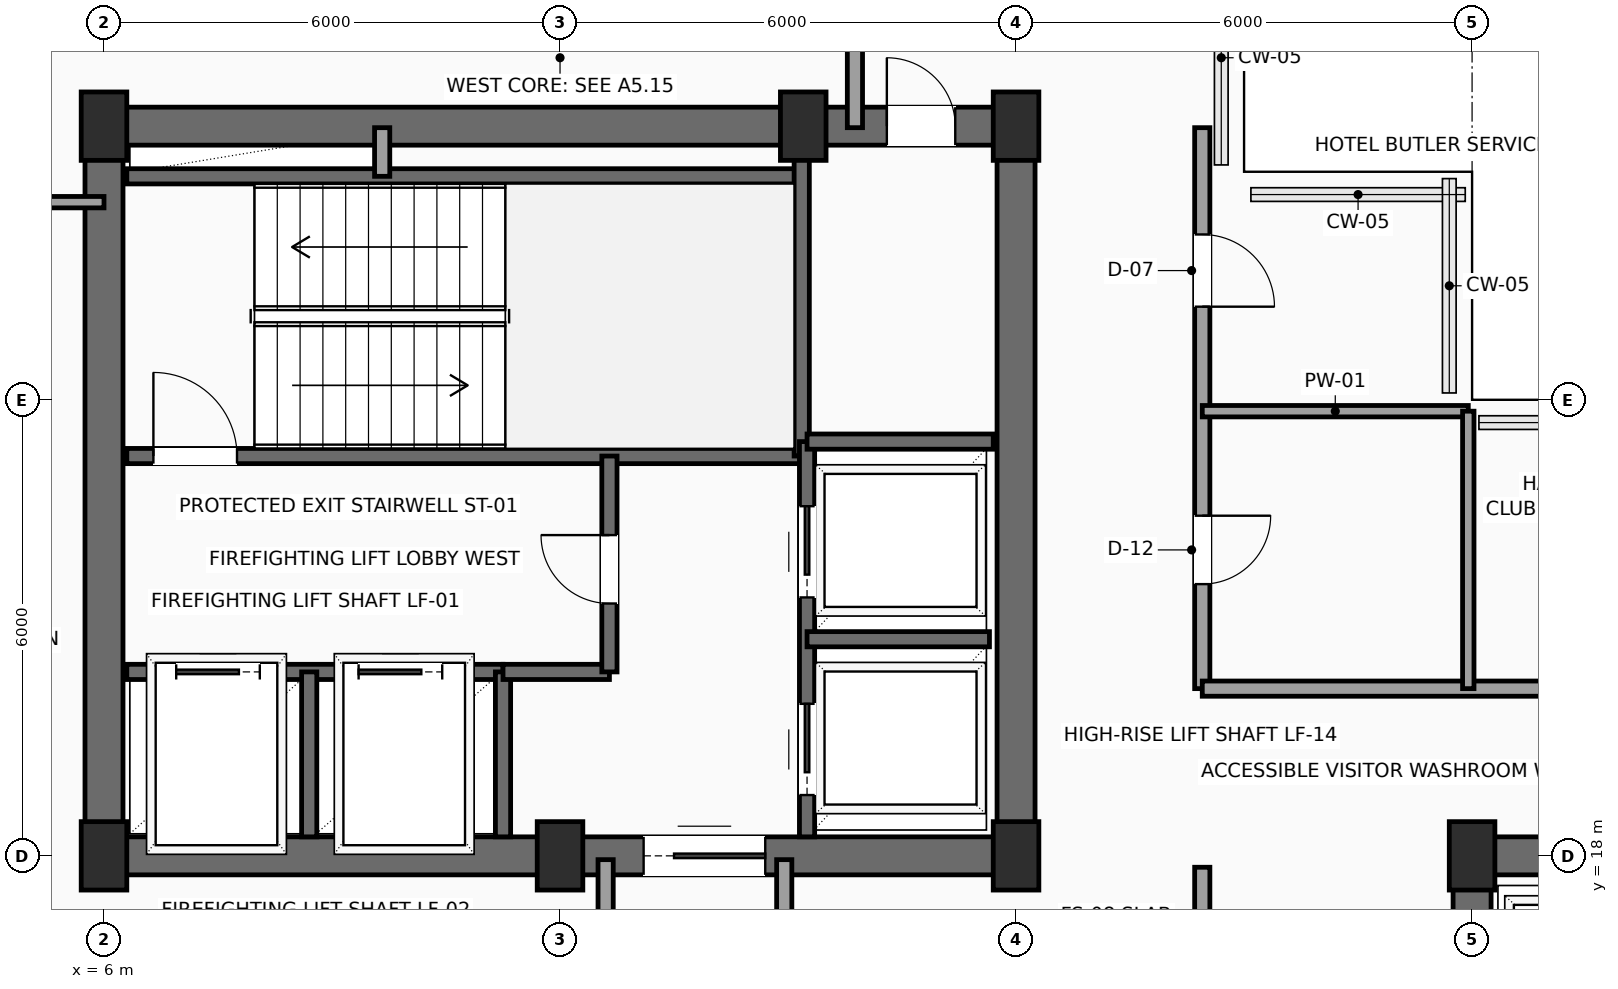
"""IFC4 building model, lengths in metres.
Left out: names, types, materials, properties, quantities, classifications, styles, units other than length and angle.
Written with IfcOpenShell. Run it as: python <this file> out.ifc"""

import sys

from ifc_helpers import new_model, si_unit, direction, frame, frame_2d, origin, origin_2d, place, context, subcontext, project, spatial, rectangle, extrude, element, fill, save


model = new_model("IFC4")
c1 = context("Model", 3, precision=1e-05, world=origin(), true_north=direction((0.0, 1.0)))
c2 = subcontext(c1, "Body", "Model", "MODEL_VIEW")
j1 = project(units=[si_unit("LENGTHUNIT", "METRE"), si_unit("PLANEANGLEUNIT", "RADIAN")], contexts=[c1])
p1 = place(None, origin())
s1 = spatial("IfcSite", under=j1, at=p1, CompositionType="ELEMENT")
p2 = place(p1, origin())
s2 = spatial("IfcBuilding", under=s1, at=p2, CompositionType="ELEMENT")
p3 = place(p2, frame((0.0, 0.0, 274.7)))
s3 = spatial("IfcBuildingStorey", under=s2, at=p3, CompositionType="ELEMENT", Elevation=274.7)
for number, where, z_axis, x_axis in (
    (1, (6.0, 18.0, 0.0), (0.0, 0.0, 1.0), (1.0, 0.0, 0.0)),
    (2, (12.0, 18.0, 0.0), (0.0, 0.0, 1.0), (1.0, 0.0, 0.0)),
    (3, (18.0, 18.0, 0.0), (0.0, 0.0, 1.0), (1.0, 0.0, 0.0)),
    (4, (6.0, 27.6, 0.0), (0.0, 0.0, 1.0), (1.0, 0.0, 0.0)),
    (5, (15.2, 27.6, 0.0), (0.0, 0.0, 1.0), (1.0, 0.0, 0.0)),
    (6, (18.0, 27.6, 0.0), (0.0, 0.0, 1.0), (1.0, 0.0, 0.0)),
    (7, (24.0, 18.0, 0.0), (0.0, 0.0, 1.0), (1.0, 0.0, 0.0)),
):
    element("IfcColumn", number, at=place(p3, frame(where, z_axis=z_axis, x_axis=x_axis)), inside=s3, PredefinedType="COLUMN", context=c2, shape_type="SweptSolid", body=[
        extrude(rectangle(XDim=0.6, YDim=0.9, at=origin_2d()), origin(), (0.0, 0.0, 1.0), 3.5),
    ])
p4 = place(p3, frame((6.0, 18.0, 0.0), z_axis=(0.0, 0.0, 1.0), x_axis=(1.0, 0.0, 0.0)))
e8 = element("IfcWall", 8, at=p4, inside=s3, PredefinedType="SHEAR", context=c2, shape_type="SweptSolid", body=[
    extrude(rectangle(XDim=12.0, YDim=0.5, at=frame_2d((6.0, 0.0))), origin(), (0.0, 0.0, 1.0), 3.3),
])
p5 = place(p4, frame((7.1, 0.0, 0.0)))
e9 = element("IfcOpeningElement", 9, at=p5, cuts=e8, PredefinedType="OPENING", context=c2, shape_type="SweptSolid", body=[
    extrude(rectangle(XDim=1.6, YDim=2.3, at=frame_2d((0.8, 1.15))), frame((0.0, 0.26, 0.0), z_axis=(0.0, -1.0, 0.0), x_axis=(1.0, 0.0, 0.0)), (0.0, 0.0, 1.0), 0.52),
])
p6 = place(p3, frame((6.0, 27.6, 0.0), z_axis=(0.0, 0.0, 1.0), x_axis=(1.0, 0.0, 0.0)))
e10 = element("IfcWall", 10, at=p6, inside=s3, PredefinedType="SHEAR", context=c2, shape_type="SweptSolid", body=[
    extrude(rectangle(XDim=12.0, YDim=0.5, at=frame_2d((6.0, 0.0))), origin(), (0.0, 0.0, 1.0), 3.3),
])
p7 = place(p6, frame((10.3, 0.0, 0.0)))
e11 = element("IfcOpeningElement", 11, at=p7, cuts=e10, PredefinedType="OPENING", context=c2, shape_type="SweptSolid", body=[
    extrude(rectangle(XDim=0.9, YDim=2.15, at=frame_2d((0.45, 1.075))), frame((0.0, 0.26, 0.0), z_axis=(0.0, -1.0, 0.0), x_axis=(1.0, 0.0, 0.0)), (0.0, 0.0, 1.0), 0.52),
])
for number, where, z_axis, x_axis in (
    (12, (6.0, 18.0, 0.0), (0.0, 0.0, 1.0), (0.0, 1.0, 0.0)),
    (13, (18.0, 18.0, 0.0), (0.0, 0.0, 1.0), (0.0, 1.0, 0.0)),
    (14, (24.0, 18.0, 0.0), (0.0, 0.0, 1.0), (1.0, 0.0, 0.0)),
):
    element("IfcWall", number, at=place(p3, frame(where, z_axis=z_axis, x_axis=x_axis)), inside=s3, PredefinedType="SHEAR", context=c2, shape_type="SweptSolid", body=[
        extrude(rectangle(XDim=9.6, YDim=0.5, at=frame_2d((4.8, 0.0))), origin(), (0.0, 0.0, 1.0), 3.3),
    ])
p8 = place(p3, frame((24.0, 6.0, 0.0), z_axis=(0.0, 0.0, 1.0), x_axis=(0.0, 1.0, 0.0)))
e15 = element("IfcWall", 15, at=p8, inside=s3, PredefinedType="SHEAR", context=c2, shape_type="SweptSolid", body=[
    extrude(rectangle(XDim=12.0, YDim=0.5, at=frame_2d((6.0, 0.0))), origin(), (0.0, 0.0, 1.0), 3.3),
])
p9 = place(p8, frame((7.15, 0.0, 0.0)))
e16 = element("IfcOpeningElement", 16, at=p9, cuts=e15, PredefinedType="OPENING", context=c2, shape_type="SweptSolid", body=[
    extrude(rectangle(XDim=1.6, YDim=2.3, at=frame_2d((0.8, 1.15))), frame((0.0, 0.26, 0.0), z_axis=(0.0, -1.0, 0.0), x_axis=(1.0, 0.0, 0.0)), (0.0, 0.0, 1.0), 0.52),
])
p10 = place(p3, frame((6.3, 23.26, 0.0), z_axis=(0.0, 0.0, 1.0), x_axis=(1.0, 0.0, 0.0)))
e17 = element("IfcWall", 17, at=p10, inside=s3, PredefinedType="SHEAR", context=c2, shape_type="SweptSolid", body=[
    extrude(rectangle(XDim=8.88, YDim=0.2, at=frame_2d((4.44, 0.0))), origin(), (0.0, 0.0, 1.0), 3.3),
])
p11 = place(p10, frame((0.35, 0.0, 0.0)))
e18 = element("IfcOpeningElement", 18, at=p11, cuts=e17, PredefinedType="OPENING", context=c2, shape_type="SweptSolid", body=[
    extrude(rectangle(XDim=1.1, YDim=2.2, at=frame_2d((0.55, 1.1))), frame((0.0, 0.11, 0.0), z_axis=(0.0, -1.0, 0.0), x_axis=(1.0, 0.0, 0.0)), (0.0, 0.0, 1.0), 0.22),
])
p12 = place(p3, frame((6.3, 26.94, 0.0), z_axis=(0.0, 0.0, 1.0), x_axis=(1.0, 0.0, 0.0)))
e19 = element("IfcWall", 19, at=p12, inside=s3, PredefinedType="SHEAR", context=c2, shape_type="SweptSolid", body=[
    extrude(rectangle(XDim=8.88, YDim=0.2, at=frame_2d((4.44, 0.0))), origin(), (0.0, 0.0, 1.0), 3.3),
])
p13 = place(p3, frame((15.18, 23.26, 0.0), z_axis=(0.0, 0.0, 1.0), x_axis=(0.0, 1.0, 0.0)))
e20 = element("IfcWall", 20, at=p13, inside=s3, PredefinedType="SHEAR", context=c2, shape_type="SweptSolid", body=[
    extrude(rectangle(XDim=4.04, YDim=0.2, at=frame_2d((2.02, 0.0))), origin(), (0.0, 0.0, 1.0), 3.3),
])
p14 = place(p3, frame((6.3, 20.42, 0.0), z_axis=(0.0, 0.0, 1.0), x_axis=(1.0, 0.0, 0.0)))
e21 = element("IfcWall", 21, at=p14, inside=s3, PredefinedType="SHEAR", context=c2, shape_type="SweptSolid", body=[
    extrude(rectangle(XDim=4.95, YDim=0.2, at=frame_2d((2.475, 0.0))), origin(), (0.0, 0.0, 1.0), 3.3),
])
p15 = place(p14, frame((0.65, 0.0, 0.0)))
e22 = element("IfcOpeningElement", 22, at=p15, cuts=e21, PredefinedType="OPENING", context=c2, shape_type="SweptSolid", body=[
    extrude(rectangle(XDim=1.1, YDim=2.2, at=frame_2d((0.55, 1.1))), frame((0.0, 0.11, 0.0), z_axis=(0.0, -1.0, 0.0), x_axis=(1.0, 0.0, 0.0)), (0.0, 0.0, 1.0), 0.22),
])
p16 = place(p14, frame((3.05, 0.0, 0.0)))
e23 = element("IfcOpeningElement", 23, at=p16, cuts=e21, PredefinedType="OPENING", context=c2, shape_type="SweptSolid", body=[
    extrude(rectangle(XDim=1.1, YDim=2.2, at=frame_2d((0.55, 1.1))), frame((0.0, 0.11, 0.0), z_axis=(0.0, -1.0, 0.0), x_axis=(1.0, 0.0, 0.0)), (0.0, 0.0, 1.0), 0.22),
])
for number, where, z_axis, x_axis in (
    (24, (8.7, 18.25, 0.0), (0.0, 0.0, 1.0), (0.0, 1.0, 0.0)),
    (25, (11.25, 18.25, 0.0), (0.0, 0.0, 1.0), (0.0, 1.0, 0.0)),
):
    element("IfcWall", number, at=place(p3, frame(where, z_axis=z_axis, x_axis=x_axis)), inside=s3, PredefinedType="SHEAR", context=c2, shape_type="SweptSolid", body=[
        extrude(rectangle(XDim=2.17, YDim=0.2, at=frame_2d((1.085, 0.0))), origin(), (0.0, 0.0, 1.0), 3.3),
    ])
p17 = place(p3, frame((11.25, 20.42, 0.0), z_axis=(0.0, 0.0, 1.0), x_axis=(1.0, 0.0, 0.0)))
e26 = element("IfcWall", 26, at=p17, inside=s3, PredefinedType="SHEAR", context=c2, shape_type="SweptSolid", body=[
    extrude(rectangle(XDim=1.4, YDim=0.2, at=frame_2d((0.7, 0.0))), origin(), (0.0, 0.0, 1.0), 3.3),
])
p18 = place(p3, frame((12.65, 20.42, 0.0), z_axis=(0.0, 0.0, 1.0), x_axis=(0.0, 1.0, 0.0)))
e27 = element("IfcWall", 27, at=p18, inside=s3, PredefinedType="SHEAR", context=c2, shape_type="SweptSolid", body=[
    extrude(rectangle(XDim=2.84, YDim=0.2, at=frame_2d((1.42, 0.0))), origin(), (0.0, 0.0, 1.0), 3.3),
])
p19 = place(p18, frame((0.9, 0.0, 0.0)))
e28 = element("IfcOpeningElement", 28, at=p19, cuts=e27, PredefinedType="OPENING", context=c2, shape_type="SweptSolid", body=[
    extrude(rectangle(XDim=0.9, YDim=2.15, at=frame_2d((0.45, 1.075))), frame((0.0, 0.11, 0.0), z_axis=(0.0, -1.0, 0.0), x_axis=(1.0, 0.0, 0.0)), (0.0, 0.0, 1.0), 0.22),
])
p20 = place(p3, frame((9.66, 26.94, 0.0), z_axis=(0.0, 0.0, 1.0), x_axis=(0.0, 1.0, 0.0)))
e29 = element("IfcWall", 29, at=p20, inside=s3, PredefinedType="SOLIDWALL", context=c2, shape_type="SweptSolid", body=[
    extrude(rectangle(XDim=0.64, YDim=0.2, at=frame_2d((0.32, 0.0))), origin(), (0.0, 0.0, 1.0), 3.3),
])
p21 = place(p3, frame((15.25, 18.25, 0.0), z_axis=(0.0, 0.0, 1.0), x_axis=(0.0, 1.0, 0.0)))
e30 = element("IfcWall", 30, at=p21, inside=s3, PredefinedType="SHEAR", context=c2, shape_type="SweptSolid", body=[
    extrude(rectangle(XDim=5.2, YDim=0.2, at=frame_2d((2.6, 0.0))), origin(), (0.0, 0.0, 1.0), 3.3),
])
p22 = place(p21, frame((0.55, 0.0, 0.0)))
e31 = element("IfcOpeningElement", 31, at=p22, cuts=e30, PredefinedType="OPENING", context=c2, shape_type="SweptSolid", body=[
    extrude(rectangle(XDim=1.2, YDim=2.2, at=frame_2d((0.6, 1.1))), frame((0.0, 0.11, 0.0), z_axis=(0.0, -1.0, 0.0), x_axis=(1.0, 0.0, 0.0)), (0.0, 0.0, 1.0), 0.22),
])
p23 = place(p21, frame((3.15, 0.0, 0.0)))
e32 = element("IfcOpeningElement", 32, at=p23, cuts=e30, PredefinedType="OPENING", context=c2, shape_type="SweptSolid", body=[
    extrude(rectangle(XDim=1.2, YDim=2.2, at=frame_2d((0.6, 1.1))), frame((0.0, 0.11, 0.0), z_axis=(0.0, -1.0, 0.0), x_axis=(1.0, 0.0, 0.0)), (0.0, 0.0, 1.0), 0.22),
])
p24 = place(p3, frame((15.25, 20.85, 0.0), z_axis=(0.0, 0.0, 1.0), x_axis=(1.0, 0.0, 0.0)))
e33 = element("IfcWall", 33, at=p24, inside=s3, PredefinedType="SHEAR", context=c2, shape_type="SweptSolid", body=[
    extrude(rectangle(XDim=2.4, YDim=0.2, at=frame_2d((1.2, 0.0))), origin(), (0.0, 0.0, 1.0), 3.3),
])
p25 = place(p3, frame((15.25, 23.45, 0.0), z_axis=(0.0, 0.0, 1.0), x_axis=(1.0, 0.0, 0.0)))
e34 = element("IfcWall", 34, at=p25, inside=s3, PredefinedType="SHEAR", context=c2, shape_type="SweptSolid", body=[
    extrude(rectangle(XDim=2.45, YDim=0.2, at=frame_2d((1.225, 0.0))), origin(), (0.0, 0.0, 1.0), 3.3),
])
for number, where, z_axis, x_axis in (
    (35, (12.6, 16.9, 0.0), (0.0, 0.0, 1.0), (0.0, 1.0, 0.0)),
    (36, (14.95, 17.95, 0.0), (0.0, 0.0, 1.0), (0.0, -1.0, 0.0)),
):
    element("IfcWall", number, at=place(p3, frame(where, z_axis=z_axis, x_axis=x_axis)), inside=s3, PredefinedType="PARTITIONING", context=c2, shape_type="SweptSolid", body=[
        extrude(rectangle(XDim=1.05, YDim=0.2, at=frame_2d((0.525, 0.0))), origin(), (0.0, 0.0, 1.0), 3.3),
    ])
p26 = place(p3, frame((15.88, 27.58, 0.0), z_axis=(0.0, 0.0, 1.0), x_axis=(0.0, 1.0, 0.0)))
e37 = element("IfcWall", 37, at=p26, inside=s3, PredefinedType="PARTITIONING", context=c2, shape_type="SweptSolid", body=[
    extrude(rectangle(XDim=2.12, YDim=0.2, at=frame_2d((1.06, 0.0))), origin(), (0.0, 0.0, 1.0), 3.3),
])
p27 = place(p3, frame((20.45, 27.58, 0.0), z_axis=(0.0, 0.0, 1.0), x_axis=(0.0, -1.0, 0.0)))
e38 = element("IfcWall", 38, at=p27, inside=s3, PredefinedType="PARTITIONING", context=c2, shape_type="SweptSolid", body=[
    extrude(rectangle(XDim=7.38, YDim=0.2, at=frame_2d((3.69, 0.0))), origin(), (0.0, 0.0, 1.0), 3.3),
])
p28 = place(p27, frame((5.105, 0.0, 0.0)))
e39 = element("IfcOpeningElement", 39, at=p28, cuts=e38, PredefinedType="OPENING", context=c2, shape_type="SweptSolid", body=[
    extrude(rectangle(XDim=0.9, YDim=2.1, at=frame_2d((0.45, 1.05))), frame((0.0, 0.11, 0.0), z_axis=(0.0, -1.0, 0.0), x_axis=(1.0, 0.0, 0.0)), (0.0, 0.0, 1.0), 0.22),
])
p29 = place(p27, frame((1.405, 0.0, 0.0)))
e40 = element("IfcOpeningElement", 40, at=p29, cuts=e38, PredefinedType="OPENING", context=c2, shape_type="SweptSolid", body=[
    extrude(rectangle(XDim=0.95, YDim=2.15, at=frame_2d((0.475, 1.075))), frame((0.0, 0.11, 0.0), z_axis=(0.0, -1.0, 0.0), x_axis=(1.0, 0.0, 0.0)), (0.0, 0.0, 1.0), 0.22),
])
p30 = place(p3, frame((20.45, 20.2, 0.0), z_axis=(0.0, 0.0, 1.0), x_axis=(1.0, 0.0, 0.0)))
e41 = element("IfcWall", 41, at=p30, inside=s3, PredefinedType="PARTITIONING", context=c2, shape_type="SweptSolid", body=[
    extrude(rectangle(XDim=13.13, YDim=0.2, at=frame_2d((6.565, 0.0))), origin(), (0.0, 0.0, 1.0), 3.3),
])
p31 = place(p30, frame((4.7, 0.0, 0.0)))
e42 = element("IfcOpeningElement", 42, at=p31, cuts=e41, PredefinedType="OPENING", context=c2, shape_type="SweptSolid", body=[
    extrude(rectangle(XDim=0.95, YDim=2.15, at=frame_2d((0.475, 1.075))), frame((0.0, 0.11, 0.0), z_axis=(0.0, -1.0, 0.0), x_axis=(1.0, 0.0, 0.0)), (0.0, 0.0, 1.0), 0.22),
])
p32 = place(p30, frame((7.875, 0.0, 0.0)))
e43 = element("IfcOpeningElement", 43, at=p32, cuts=e41, PredefinedType="OPENING", context=c2, shape_type="SweptSolid", body=[
    extrude(rectangle(XDim=0.95, YDim=2.15, at=frame_2d((0.475, 1.075))), frame((0.0, 0.11, 0.0), z_axis=(0.0, -1.0, 0.0), x_axis=(1.0, 0.0, 0.0)), (0.0, 0.0, 1.0), 0.22),
])
p33 = place(p30, frame((11.05, 0.0, 0.0)))
e44 = element("IfcOpeningElement", 44, at=p33, cuts=e41, PredefinedType="OPENING", context=c2, shape_type="SweptSolid", body=[
    extrude(rectangle(XDim=0.95, YDim=2.15, at=frame_2d((0.475, 1.075))), frame((0.0, 0.11, 0.0), z_axis=(0.0, -1.0, 0.0), x_axis=(1.0, 0.0, 0.0)), (0.0, 0.0, 1.0), 0.22),
])
p34 = place(p3, frame((20.45, 17.85, 0.0), z_axis=(0.0, 0.0, 1.0), x_axis=(0.0, -1.0, 0.0)))
e45 = element("IfcWall", 45, at=p34, inside=s3, PredefinedType="PARTITIONING", context=c2, shape_type="SweptSolid", body=[
    extrude(rectangle(XDim=0.95, YDim=0.2, at=frame_2d((0.475, 0.0))), origin(), (0.0, 0.0, 1.0), 3.3),
])
p35 = place(p3, frame((20.45, 23.85, 0.0), z_axis=(0.0, 0.0, 1.0), x_axis=(1.0, 0.0, 0.0)))
e46 = element("IfcWall", 46, at=p35, inside=s3, PredefinedType="PARTITIONING", context=c2, shape_type="SweptSolid", body=[
    extrude(rectangle(XDim=3.5, YDim=0.15, at=frame_2d((1.75, 0.0))), origin(), (0.0, 0.0, 1.0), 3.3),
])
p36 = place(p3, frame((23.95, 20.2, 0.0), z_axis=(0.0, 0.0, 1.0), x_axis=(0.0, 1.0, 0.0)))
e47 = element("IfcWall", 47, at=p36, inside=s3, PredefinedType="PARTITIONING", context=c2, shape_type="SweptSolid", body=[
    extrude(rectangle(XDim=3.65, YDim=0.15, at=frame_2d((1.825, 0.0))), origin(), (0.0, 0.0, 1.0), 3.3),
])
p37 = place(p3, frame((0.3, 26.6, 0.0), z_axis=(0.0, 0.0, 1.0), x_axis=(1.0, 0.0, 0.0)))
e48 = element("IfcWall", 48, at=p37, inside=s3, PredefinedType="PARTITIONING", context=c2, shape_type="SweptSolid", body=[
    extrude(rectangle(XDim=5.7, YDim=0.15, at=frame_2d((2.85, 0.0))), origin(), (0.0, 0.0, 1.0), 3.3),
])
p38 = place(p5, origin())
e49 = element("IfcDoor", 49, at=p38, inside=s3, OperationType="DOUBLE_DOOR_SLIDING", PredefinedType="DOOR", context=c2, shape_type="SweptSolid", body=[
    extrude(rectangle(XDim=1.6, YDim=2.3, at=frame_2d((0.8, 1.15))), frame((0.0, 0.025, 0.0), z_axis=(0.0, -1.0, 0.0), x_axis=(1.0, 0.0, 0.0)), (0.0, 0.0, 1.0), 0.05),
])
fill(e9, e49)
p39 = place(p7, origin())
e50 = element("IfcDoor", 50, at=p39, inside=s3, OperationType="SINGLE_SWING_LEFT", PredefinedType="DOOR", context=c2, shape_type="SweptSolid", body=[
    extrude(rectangle(XDim=0.9, YDim=2.15, at=frame_2d((0.45, 1.075))), frame((0.0, 0.025, 0.0), z_axis=(0.0, -1.0, 0.0), x_axis=(1.0, 0.0, 0.0)), (0.0, 0.0, 1.0), 0.05),
])
fill(e11, e50)
p40 = place(p11, origin())
e51 = element("IfcDoor", 51, at=p40, inside=s3, OperationType="SINGLE_SWING_LEFT", PredefinedType="DOOR", context=c2, shape_type="SweptSolid", body=[
    extrude(rectangle(XDim=1.1, YDim=2.2, at=frame_2d((0.55, 1.1))), frame((0.0, 0.025, 0.0), z_axis=(0.0, -1.0, 0.0), x_axis=(1.0, 0.0, 0.0)), (0.0, 0.0, 1.0), 0.05),
])
fill(e18, e51)
p41 = place(p15, origin())
e52 = element("IfcDoor", 52, at=p41, inside=s3, OperationType="SLIDING_TO_LEFT", PredefinedType="DOOR", context=c2, shape_type="SweptSolid", body=[
    extrude(rectangle(XDim=1.1, YDim=2.2, at=frame_2d((0.55, 1.1))), frame((0.0, 0.025, 0.0), z_axis=(0.0, -1.0, 0.0), x_axis=(1.0, 0.0, 0.0)), (0.0, 0.0, 1.0), 0.05),
])
fill(e22, e52)
p42 = place(p16, origin())
e53 = element("IfcDoor", 53, at=p42, inside=s3, OperationType="SLIDING_TO_LEFT", PredefinedType="DOOR", context=c2, shape_type="SweptSolid", body=[
    extrude(rectangle(XDim=1.1, YDim=2.2, at=frame_2d((0.55, 1.1))), frame((0.0, 0.025, 0.0), z_axis=(0.0, -1.0, 0.0), x_axis=(1.0, 0.0, 0.0)), (0.0, 0.0, 1.0), 0.05),
])
fill(e23, e53)
p43 = place(p19, origin())
e54 = element("IfcDoor", 54, at=p43, inside=s3, OperationType="SINGLE_SWING_RIGHT", PredefinedType="DOOR", context=c2, shape_type="SweptSolid", body=[
    extrude(rectangle(XDim=0.9, YDim=2.15, at=frame_2d((0.45, 1.075))), frame((0.0, 0.025, 0.0), z_axis=(0.0, -1.0, 0.0), x_axis=(1.0, 0.0, 0.0)), (0.0, 0.0, 1.0), 0.05),
])
fill(e28, e54)
p44 = place(p22, origin())
e55 = element("IfcDoor", 55, at=p44, inside=s3, OperationType="SLIDING_TO_RIGHT", PredefinedType="DOOR", context=c2, shape_type="SweptSolid", body=[
    extrude(rectangle(XDim=1.2, YDim=2.2, at=frame_2d((0.6, 1.1))), frame((0.0, 0.025, 0.0), z_axis=(0.0, -1.0, 0.0), x_axis=(1.0, 0.0, 0.0)), (0.0, 0.0, 1.0), 0.05),
])
fill(e31, e55)
p45 = place(p23, origin())
e56 = element("IfcDoor", 56, at=p45, inside=s3, OperationType="SLIDING_TO_RIGHT", PredefinedType="DOOR", context=c2, shape_type="SweptSolid", body=[
    extrude(rectangle(XDim=1.2, YDim=2.2, at=frame_2d((0.6, 1.1))), frame((0.0, 0.025, 0.0), z_axis=(0.0, -1.0, 0.0), x_axis=(1.0, 0.0, 0.0)), (0.0, 0.0, 1.0), 0.05),
])
fill(e32, e56)
p46 = place(p28, origin())
e57 = element("IfcDoor", 57, at=p46, inside=s3, OperationType="SINGLE_SWING_LEFT", PredefinedType="DOOR", context=c2, shape_type="SweptSolid", body=[
    extrude(rectangle(XDim=0.9, YDim=2.1, at=frame_2d((0.45, 1.05))), frame((0.0, 0.025, 0.0), z_axis=(0.0, -1.0, 0.0), x_axis=(1.0, 0.0, 0.0)), (0.0, 0.0, 1.0), 0.05),
])
fill(e39, e57)
p47 = place(p29, origin())
e58 = element("IfcDoor", 58, at=p47, inside=s3, OperationType="SINGLE_SWING_RIGHT", PredefinedType="DOOR", context=c2, shape_type="SweptSolid", body=[
    extrude(rectangle(XDim=0.95, YDim=2.15, at=frame_2d((0.475, 1.075))), frame((0.0, 0.025, 0.0), z_axis=(0.0, -1.0, 0.0), x_axis=(1.0, 0.0, 0.0)), (0.0, 0.0, 1.0), 0.05),
])
fill(e40, e58)
save(model, sys.argv[1])
